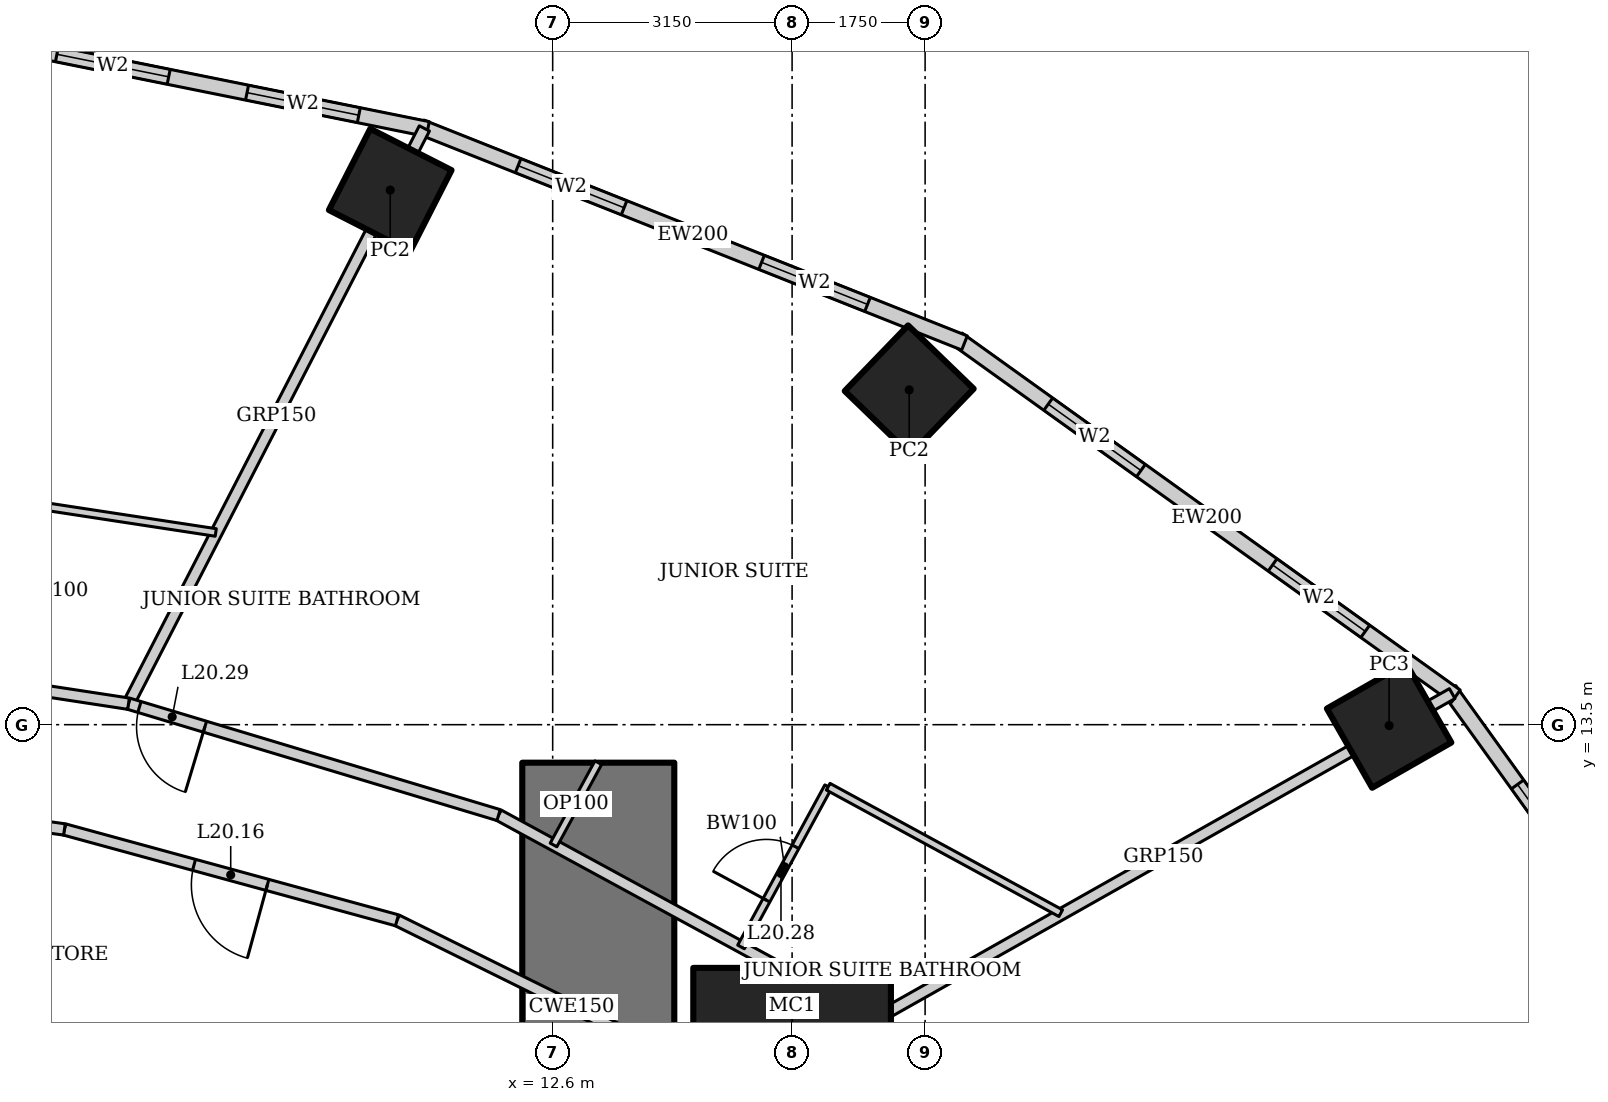
"""IFC4 building model, lengths in metres.
Left out: names, types, materials, properties, quantities, classifications, styles, units other than length and angle.
Written with IfcOpenShell. Run it as: python <this file> out.ifc"""

import sys

from ifc_helpers import new_model, si_unit, direction, frame, frame_2d, origin, origin_2d, place, context, subcontext, project, spatial, rectangle, hollow_rectangle, extrude, element, fill, save


model = new_model("IFC4")
c1 = context("Model", 3, precision=1e-05, world=origin(), true_north=direction((0.0, 1.0)))
c2 = subcontext(c1, "Body", "Model", "MODEL_VIEW")
j1 = project(units=[si_unit("LENGTHUNIT", "METRE"), si_unit("PLANEANGLEUNIT", "RADIAN")], contexts=[c1])
p1 = place(None, origin())
s1 = spatial("IfcSite", under=j1, at=p1, CompositionType="ELEMENT")
p2 = place(p1, origin())
s2 = spatial("IfcBuilding", under=s1, at=p2, CompositionType="ELEMENT")
p3 = place(p2, frame((0.0, 0.0, 87.4)))
s3 = spatial("IfcBuildingStorey", under=s2, at=p3, CompositionType="ELEMENT", Elevation=87.4)
p4 = place(p3, frame((15.75, 9.0, 0.0), z_axis=(0.0, 0.0, 1.0), x_axis=(1.0, 0.0, 0.0)))
e1 = element("IfcColumn", 1, at=p4, inside=s3, PredefinedType="COLUMN", context=c2, shape_type="SweptSolid", body=[
    extrude(hollow_rectangle(XDim=2.6, YDim=2.6, WallThickness=0.13, at=origin_2d()), origin(), (0.0, 0.0, 1.0), 3.6),
])
p5 = place(p3, frame((23.605, 13.489, 0.0), z_axis=(0.0, 0.0, 1.0), x_axis=(0.86824298017, 0.496139221777, 0.0)))
e2 = element("IfcColumn", 2, at=p5, inside=s3, PredefinedType="COLUMN", context=c2, shape_type="SweptSolid", body=[
    extrude(hollow_rectangle(XDim=1.2, YDim=1.2, WallThickness=0.12, at=origin_2d()), origin(), (0.0, 0.0, 1.0), 3.6),
])
for number, where, z_axis, x_axis in (
    (3, (17.291, 17.905, 0.0), (0.0, 0.0, 1.0), (0.695, 0.719, 0.0)),
    (4, (10.463, 20.534, 0.0), (0.0, 0.0, 1.0), (0.454, 0.891, 0.0)),
):
    element("IfcColumn", number, at=place(p3, frame(where, z_axis=z_axis, x_axis=x_axis)), inside=s3, PredefinedType="COLUMN", context=c2, shape_type="SweptSolid", body=[
        extrude(hollow_rectangle(XDim=1.2, YDim=1.2, WallThickness=0.1, at=origin_2d()), origin(), (0.0, 0.0, 1.0), 3.6),
    ])
p6 = place(p3, frame((13.2, -13.0, 0.0), z_axis=(0.0, 0.0, 1.0), x_axis=(0.0, 1.0, 0.0)))
e5 = element("IfcWall", 5, at=p6, inside=s3, PredefinedType="SHEAR", context=c2, shape_type="SweptSolid", body=[
    extrude(rectangle(XDim=26.0, YDim=2.0, at=frame_2d((13.0, 0.0))), origin(), (0.0, 0.0, 1.0), 3.6),
])
p7 = place(p6, frame((12.1, 0.0, 0.0)))
e6 = element("IfcOpeningElement", 6, at=p7, cuts=e5, PredefinedType="OPENING", context=c2, shape_type="SweptSolid", body=[
    extrude(rectangle(XDim=1.8, YDim=2.1, at=frame_2d((0.9, 1.05))), frame((0.0, 1.01, 0.0), z_axis=(0.0, -1.0, 0.0), x_axis=(1.0, 0.0, 0.0)), (0.0, 0.0, 1.0), 2.02),
])
p8 = place(p3, frame((29.26, 7.2, 0.0), z_axis=(0.0, 0.0, 1.0), x_axis=(-0.583937613703, 0.811798536155, 0.0)))
e7 = element("IfcWall", 7, at=p8, inside=s3, PredefinedType="SOLIDWALL", context=c2, shape_type="SweptSolid", body=[
    extrude(rectangle(XDim=8.323, YDim=0.2, at=frame_2d((4.162, 0.0))), origin(), (0.0, 0.0, 1.0), 3.45),
])
p9 = place(p8, frame((1.531, 0.0, 0.5)))
e8 = element("IfcOpeningElement", 8, at=p9, cuts=e7, PredefinedType="OPENING", context=c2, shape_type="SweptSolid", body=[
    extrude(rectangle(XDim=1.5, YDim=2.2, at=frame_2d((0.75, 1.1))), frame((0.0, 0.11, 0.0), z_axis=(0.0, -1.0, 0.0), x_axis=(1.0, 0.0, 0.0)), (0.0, 0.0, 1.0), 0.22),
])
p10 = place(p8, frame((5.292, 0.0, 0.5)))
e9 = element("IfcOpeningElement", 9, at=p10, cuts=e7, PredefinedType="OPENING", context=c2, shape_type="SweptSolid", body=[
    extrude(rectangle(XDim=1.5, YDim=2.2, at=frame_2d((0.75, 1.1))), frame((0.0, 0.11, 0.0), z_axis=(0.0, -1.0, 0.0), x_axis=(1.0, 0.0, 0.0)), (0.0, 0.0, 1.0), 0.22),
])
p11 = place(p3, frame((24.482, 13.875, 0.0), z_axis=(0.0, 0.0, 1.0), x_axis=(-0.812791321576, 0.582554948112, 0.0)))
e10 = element("IfcWall", 10, at=p11, inside=s3, PredefinedType="SOLIDWALL", context=c2, shape_type="SweptSolid", body=[
    extrude(rectangle(XDim=8.063, YDim=0.2, at=frame_2d((4.032, 0.0))), origin(), (0.0, 0.0, 1.0), 3.45),
])
p12 = place(p11, frame((1.466, 0.0, 0.5)))
e11 = element("IfcOpeningElement", 11, at=p12, cuts=e10, PredefinedType="OPENING", context=c2, shape_type="SweptSolid", body=[
    extrude(rectangle(XDim=1.5, YDim=2.2, at=frame_2d((0.75, 1.1))), frame((0.0, 0.11, 0.0), z_axis=(0.0, -1.0, 0.0), x_axis=(1.0, 0.0, 0.0)), (0.0, 0.0, 1.0), 0.22),
])
p13 = place(p11, frame((5.097, 0.0, 0.5)))
e12 = element("IfcOpeningElement", 12, at=p13, cuts=e10, PredefinedType="OPENING", context=c2, shape_type="SweptSolid", body=[
    extrude(rectangle(XDim=1.5, YDim=2.2, at=frame_2d((0.75, 1.1))), frame((0.0, 0.11, 0.0), z_axis=(0.0, -1.0, 0.0), x_axis=(1.0, 0.0, 0.0)), (0.0, 0.0, 1.0), 0.22),
])
p14 = place(p3, frame((18.018, 18.523, 0.0), z_axis=(0.0, 0.0, 1.0), x_axis=(-0.929358351251, 0.369178892895, 0.0)))
e13 = element("IfcWall", 13, at=p14, inside=s3, PredefinedType="SOLIDWALL", context=c2, shape_type="SweptSolid", body=[
    extrude(rectangle(XDim=7.692, YDim=0.2, at=frame_2d((3.846, 0.0))), origin(), (0.0, 0.0, 1.0), 3.45),
])
p15 = place(p14, frame((1.373, 0.0, 0.5)))
e14 = element("IfcOpeningElement", 14, at=p15, cuts=e13, PredefinedType="OPENING", context=c2, shape_type="SweptSolid", body=[
    extrude(rectangle(XDim=1.5, YDim=2.2, at=frame_2d((0.75, 1.1))), frame((0.0, 0.11, 0.0), z_axis=(0.0, -1.0, 0.0), x_axis=(1.0, 0.0, 0.0)), (0.0, 0.0, 1.0), 0.22),
])
p16 = place(p14, frame((4.819, 0.0, 0.5)))
e15 = element("IfcOpeningElement", 15, at=p16, cuts=e13, PredefinedType="OPENING", context=c2, shape_type="SweptSolid", body=[
    extrude(rectangle(XDim=1.5, YDim=2.2, at=frame_2d((0.75, 1.1))), frame((0.0, 0.11, 0.0), z_axis=(0.0, -1.0, 0.0), x_axis=(1.0, 0.0, 0.0)), (0.0, 0.0, 1.0), 0.22),
])
p17 = place(p3, frame((10.957, 21.337, 0.0), z_axis=(0.0, 0.0, 1.0), x_axis=(-0.980251657452, 0.197754110105, 0.0)))
e16 = element("IfcWall", 16, at=p17, inside=s3, PredefinedType="SOLIDWALL", context=c2, shape_type="SweptSolid", body=[
    extrude(rectangle(XDim=5.904, YDim=0.2, at=frame_2d((2.952, 0.0))), origin(), (0.0, 0.0, 1.0), 3.45),
])
p18 = place(p17, frame((0.926, 0.0, 0.5)))
e17 = element("IfcOpeningElement", 17, at=p18, cuts=e16, PredefinedType="OPENING", context=c2, shape_type="SweptSolid", body=[
    extrude(rectangle(XDim=1.5, YDim=2.2, at=frame_2d((0.75, 1.1))), frame((0.0, 0.11, 0.0), z_axis=(0.0, -1.0, 0.0), x_axis=(1.0, 0.0, 0.0)), (0.0, 0.0, 1.0), 0.22),
])
p19 = place(p17, frame((3.478, 0.0, 0.5)))
e18 = element("IfcOpeningElement", 18, at=p19, cuts=e16, PredefinedType="OPENING", context=c2, shape_type="SweptSolid", body=[
    extrude(rectangle(XDim=1.5, YDim=2.2, at=frame_2d((0.75, 1.1))), frame((0.0, 0.11, 0.0), z_axis=(0.0, -1.0, 0.0), x_axis=(1.0, 0.0, 0.0)), (0.0, 0.0, 1.0), 0.22),
])
p20 = place(p3, frame((24.435, 13.909, 0.0), z_axis=(0.0, 0.0, 1.0), x_axis=(-0.87090601027, -0.491449612143, 0.0)))
e19 = element("IfcWall", 19, at=p20, inside=s3, PredefinedType="PARTITIONING", context=c2, shape_type="SweptSolid", body=[
    extrude(rectangle(XDim=8.726, YDim=0.15, at=frame_2d((4.363, 0.0))), origin(), (0.0, 0.0, 1.0), 2.693),
])
p21 = place(p3, frame((10.912, 21.346, 0.0), z_axis=(0.0, 0.0, 1.0), x_axis=(-0.457327273085, -0.889298468059, 0.0)))
e20 = element("IfcWall", 20, at=p21, inside=s3, PredefinedType="PARTITIONING", context=c2, shape_type="SweptSolid", body=[
    extrude(rectangle(XDim=8.511, YDim=0.15, at=frame_2d((4.256, 0.0))), origin(), (0.0, 0.0, 1.0), 2.528),
])
p22 = place(p3, frame((20.984, 5.232, 0.0), z_axis=(0.0, 0.0, 1.0), x_axis=(-0.687062608696, 0.726598218916, 0.0)))
e21 = element("IfcWall", 21, at=p22, inside=s3, PredefinedType="PARTITIONING", context=c2, shape_type="SweptSolid", body=[
    extrude(rectangle(XDim=6.039, YDim=0.15, at=frame_2d((3.02, 0.0))), origin(), (0.0, 0.0, 1.0), 3.45),
])
p23 = place(p22, frame((0.15, 0.0, 0.0)))
e22 = element("IfcOpeningElement", 22, at=p23, cuts=e21, PredefinedType="OPENING", context=c2, shape_type="SweptSolid", body=[
    extrude(rectangle(XDim=0.9, YDim=2.1, at=frame_2d((0.45, 1.05))), frame((0.0, 0.085, 0.0), z_axis=(0.0, -1.0, 0.0), x_axis=(1.0, 0.0, 0.0)), (0.0, 0.0, 1.0), 0.17),
])
p24 = place(p3, frame((16.835, 9.62, 0.0), z_axis=(0.0, 0.0, 1.0), x_axis=(-0.878450059298, 0.477834169267, 0.0)))
e23 = element("IfcWall", 23, at=p24, inside=s3, PredefinedType="PARTITIONING", context=c2, shape_type="SweptSolid", body=[
    extrude(rectangle(XDim=5.631, YDim=0.15, at=frame_2d((2.815, 0.0))), origin(), (0.0, 0.0, 1.0), 3.45),
])
p25 = place(p3, frame((11.888, 12.311, 0.0), z_axis=(0.0, 0.0, 1.0), x_axis=(-0.957564241242, 0.288219922793, 0.0)))
e24 = element("IfcWall", 24, at=p25, inside=s3, PredefinedType="PARTITIONING", context=c2, shape_type="SweptSolid", body=[
    extrude(rectangle(XDim=5.085, YDim=0.15, at=frame_2d((2.542, 0.0))), origin(), (0.0, 0.0, 1.0), 3.45),
])
p26 = place(p25, frame((4.035, 0.0, 0.0)))
e25 = element("IfcOpeningElement", 25, at=p26, cuts=e24, PredefinedType="OPENING", context=c2, shape_type="SweptSolid", body=[
    extrude(rectangle(XDim=0.9, YDim=2.1, at=frame_2d((0.45, 1.05))), frame((0.0, 0.085, 0.0), z_axis=(0.0, -1.0, 0.0), x_axis=(1.0, 0.0, 0.0)), (0.0, 0.0, 1.0), 0.17),
])
p27 = place(p3, frame((7.019, 13.776, 0.0), z_axis=(0.0, 0.0, 1.0), x_axis=(-0.988564270062, 0.150800145746, 0.0)))
e26 = element("IfcWall", 26, at=p27, inside=s3, PredefinedType="PARTITIONING", context=c2, shape_type="SweptSolid", body=[
    extrude(rectangle(XDim=3.751, YDim=0.15, at=frame_2d((1.875, 0.0))), origin(), (0.0, 0.0, 1.0), 3.45),
])
p28 = place(p3, frame((15.147, 8.656, 0.0), z_axis=(0.0, 0.0, 1.0), x_axis=(-0.89656943448, 0.442903205177, 0.0)))
e27 = element("IfcWall", 27, at=p28, inside=s3, PredefinedType="PARTITIONING", context=c2, shape_type="SweptSolid", body=[
    extrude(rectangle(XDim=5.126, YDim=0.15, at=frame_2d((2.563, 0.0))), origin(), (0.0, 0.0, 1.0), 3.45),
])
p29 = place(p3, frame((10.551, 10.926, 0.0), z_axis=(0.0, 0.0, 1.0), x_axis=(-0.964644466646, 0.263554648923, 0.0)))
e28 = element("IfcWall", 28, at=p29, inside=s3, PredefinedType="PARTITIONING", context=c2, shape_type="SweptSolid", body=[
    extrude(rectangle(XDim=4.535, YDim=0.15, at=frame_2d((2.268, 0.0))), origin(), (0.0, 0.0, 1.0), 3.45),
])
p30 = place(p29, frame((1.768, 0.0, 0.0)))
e29 = element("IfcOpeningElement", 29, at=p30, cuts=e28, PredefinedType="OPENING", context=c2, shape_type="SweptSolid", body=[
    extrude(rectangle(XDim=1.0, YDim=2.1, at=frame_2d((0.5, 1.05))), frame((0.0, 0.085, 0.0), z_axis=(0.0, -1.0, 0.0), x_axis=(1.0, 0.0, 0.0)), (0.0, 0.0, 1.0), 0.17),
])
p31 = place(p3, frame((6.176, 12.122, 0.0), z_axis=(0.0, 0.0, 1.0), x_axis=(-0.990563451353, 0.137054911782, 0.0)))
e30 = element("IfcWall", 30, at=p31, inside=s3, PredefinedType="PARTITIONING", context=c2, shape_type="SweptSolid", body=[
    extrude(rectangle(XDim=3.304, YDim=0.15, at=frame_2d((1.652, 0.0))), origin(), (0.0, 0.0, 1.0), 3.45),
])
p32 = place(p3, frame((15.078, 10.576, 0.0), z_axis=(0.0, 0.0, 1.0), x_axis=(0.477832549678, 0.878450940274, 0.0)))
e31 = element("IfcWall", 31, at=p32, inside=s3, PredefinedType="PARTITIONING", context=c2, shape_type="SweptSolid", body=[
    extrude(rectangle(XDim=2.4, YDim=0.1, at=frame_2d((1.2, 0.0))), origin(), (0.0, 0.0, 1.0), 3.45),
])
p33 = place(p32, frame((0.7, 0.0, 0.0)))
e32 = element("IfcOpeningElement", 32, at=p33, cuts=e31, PredefinedType="OPENING", context=c2, shape_type="SweptSolid", body=[
    extrude(rectangle(XDim=0.8, YDim=2.1, at=frame_2d((0.4, 1.05))), frame((0.0, 0.06, 0.0), z_axis=(0.0, -1.0, 0.0), x_axis=(1.0, 0.0, 0.0)), (0.0, 0.0, 1.0), 0.12),
])
p34 = place(p3, frame((16.225, 12.684, 0.0), z_axis=(0.0, 0.0, 1.0), x_axis=(0.878473578893, -0.477790928322, 0.0)))
e33 = element("IfcWall", 33, at=p34, inside=s3, PredefinedType="PARTITIONING", context=c2, shape_type="SweptSolid", body=[
    extrude(rectangle(XDim=3.483, YDim=0.1, at=frame_2d((1.741, 0.0))), origin(), (0.0, 0.0, 1.0), 3.45),
])
p35 = place(p3, frame((5.404, 16.45, 0.0), z_axis=(0.0, 0.0, 1.0), x_axis=(0.988568792086, -0.150770498819, 0.0)))
e34 = element("IfcWall", 34, at=p35, inside=s3, PredefinedType="PARTITIONING", context=c2, shape_type="SweptSolid", body=[
    extrude(rectangle(XDim=2.795, YDim=0.1, at=frame_2d((1.397, 0.0))), origin(), (0.0, 0.0, 1.0), 3.45),
])
p36 = place(p3, frame((13.2, 13.0, 0.0), z_axis=(0.0, 0.0, 1.0), x_axis=(-0.477852414256, -0.878440134665, 0.0)))
e35 = element("IfcWall", 35, at=p36, inside=s3, PredefinedType="PARTITIONING", context=c2, shape_type="SweptSolid", body=[
    extrude(rectangle(XDim=1.232, YDim=0.1, at=frame_2d((0.616, 0.0))), origin(), (0.0, 0.0, 1.0), 3.45),
])
p37 = place(p10, origin())
e36 = element("IfcWindow", 36, at=p37, inside=s3, PartitioningType="SINGLE_PANEL", PredefinedType="WINDOW", context=c2, shape_type="SweptSolid", body=[
    extrude(rectangle(XDim=1.5, YDim=2.2, at=frame_2d((0.75, 1.1))), frame((0.0, 0.03, 0.0), z_axis=(0.0, -1.0, 0.0), x_axis=(1.0, 0.0, 0.0)), (0.0, 0.0, 1.0), 0.06),
])
fill(e9, e36)
p38 = place(p12, origin())
e37 = element("IfcWindow", 37, at=p38, inside=s3, PartitioningType="SINGLE_PANEL", PredefinedType="WINDOW", context=c2, shape_type="SweptSolid", body=[
    extrude(rectangle(XDim=1.5, YDim=2.2, at=frame_2d((0.75, 1.1))), frame((0.0, 0.03, 0.0), z_axis=(0.0, -1.0, 0.0), x_axis=(1.0, 0.0, 0.0)), (0.0, 0.0, 1.0), 0.06),
])
fill(e11, e37)
p39 = place(p13, origin())
e38 = element("IfcWindow", 38, at=p39, inside=s3, PartitioningType="SINGLE_PANEL", PredefinedType="WINDOW", context=c2, shape_type="SweptSolid", body=[
    extrude(rectangle(XDim=1.5, YDim=2.2, at=frame_2d((0.75, 1.1))), frame((0.0, 0.03, 0.0), z_axis=(0.0, -1.0, 0.0), x_axis=(1.0, 0.0, 0.0)), (0.0, 0.0, 1.0), 0.06),
])
fill(e12, e38)
p40 = place(p15, origin())
e39 = element("IfcWindow", 39, at=p40, inside=s3, PartitioningType="SINGLE_PANEL", PredefinedType="WINDOW", context=c2, shape_type="SweptSolid", body=[
    extrude(rectangle(XDim=1.5, YDim=2.2, at=frame_2d((0.75, 1.1))), frame((0.0, 0.03, 0.0), z_axis=(0.0, -1.0, 0.0), x_axis=(1.0, 0.0, 0.0)), (0.0, 0.0, 1.0), 0.06),
])
fill(e14, e39)
p41 = place(p16, origin())
e40 = element("IfcWindow", 40, at=p41, inside=s3, PartitioningType="SINGLE_PANEL", PredefinedType="WINDOW", context=c2, shape_type="SweptSolid", body=[
    extrude(rectangle(XDim=1.5, YDim=2.2, at=frame_2d((0.75, 1.1))), frame((0.0, 0.03, 0.0), z_axis=(0.0, -1.0, 0.0), x_axis=(1.0, 0.0, 0.0)), (0.0, 0.0, 1.0), 0.06),
])
fill(e15, e40)
p42 = place(p18, origin())
e41 = element("IfcWindow", 41, at=p42, inside=s3, PartitioningType="SINGLE_PANEL", PredefinedType="WINDOW", context=c2, shape_type="SweptSolid", body=[
    extrude(rectangle(XDim=1.5, YDim=2.2, at=frame_2d((0.75, 1.1))), frame((0.0, 0.03, 0.0), z_axis=(0.0, -1.0, 0.0), x_axis=(1.0, 0.0, 0.0)), (0.0, 0.0, 1.0), 0.06),
])
fill(e17, e41)
p43 = place(p19, origin())
e42 = element("IfcWindow", 42, at=p43, inside=s3, PartitioningType="SINGLE_PANEL", PredefinedType="WINDOW", context=c2, shape_type="SweptSolid", body=[
    extrude(rectangle(XDim=1.5, YDim=2.2, at=frame_2d((0.75, 1.1))), frame((0.0, 0.03, 0.0), z_axis=(0.0, -1.0, 0.0), x_axis=(1.0, 0.0, 0.0)), (0.0, 0.0, 1.0), 0.06),
])
fill(e18, e42)
p44 = place(p30, origin())
e43 = element("IfcDoor", 43, at=p44, inside=s3, OperationType="SINGLE_SWING_LEFT", PredefinedType="DOOR", context=c2, shape_type="SweptSolid", body=[
    extrude(rectangle(XDim=1.0, YDim=2.1, at=frame_2d((0.5, 1.05))), frame((0.0, 0.025, 0.0), z_axis=(0.0, -1.0, 0.0), x_axis=(1.0, 0.0, 0.0)), (0.0, 0.0, 1.0), 0.05),
])
fill(e29, e43)
p45 = place(p33, origin())
e44 = element("IfcDoor", 44, at=p45, inside=s3, OperationType="SINGLE_SWING_LEFT", PredefinedType="DOOR", context=c2, shape_type="SweptSolid", body=[
    extrude(rectangle(XDim=0.8, YDim=2.1, at=frame_2d((0.4, 1.05))), frame((0.0, 0.025, 0.0), z_axis=(0.0, -1.0, 0.0), x_axis=(1.0, 0.0, 0.0)), (0.0, 0.0, 1.0), 0.05),
])
fill(e32, e44)
p46 = place(p26, origin())
e45 = element("IfcDoor", 45, at=p46, inside=s3, OperationType="SINGLE_SWING_LEFT", PredefinedType="DOOR", context=c2, shape_type="SweptSolid", body=[
    extrude(rectangle(XDim=0.9, YDim=2.1, at=frame_2d((0.45, 1.05))), frame((0.0, 0.025, 0.0), z_axis=(0.0, -1.0, 0.0), x_axis=(1.0, 0.0, 0.0)), (0.0, 0.0, 1.0), 0.05),
])
fill(e25, e45)
save(model, sys.argv[1])
